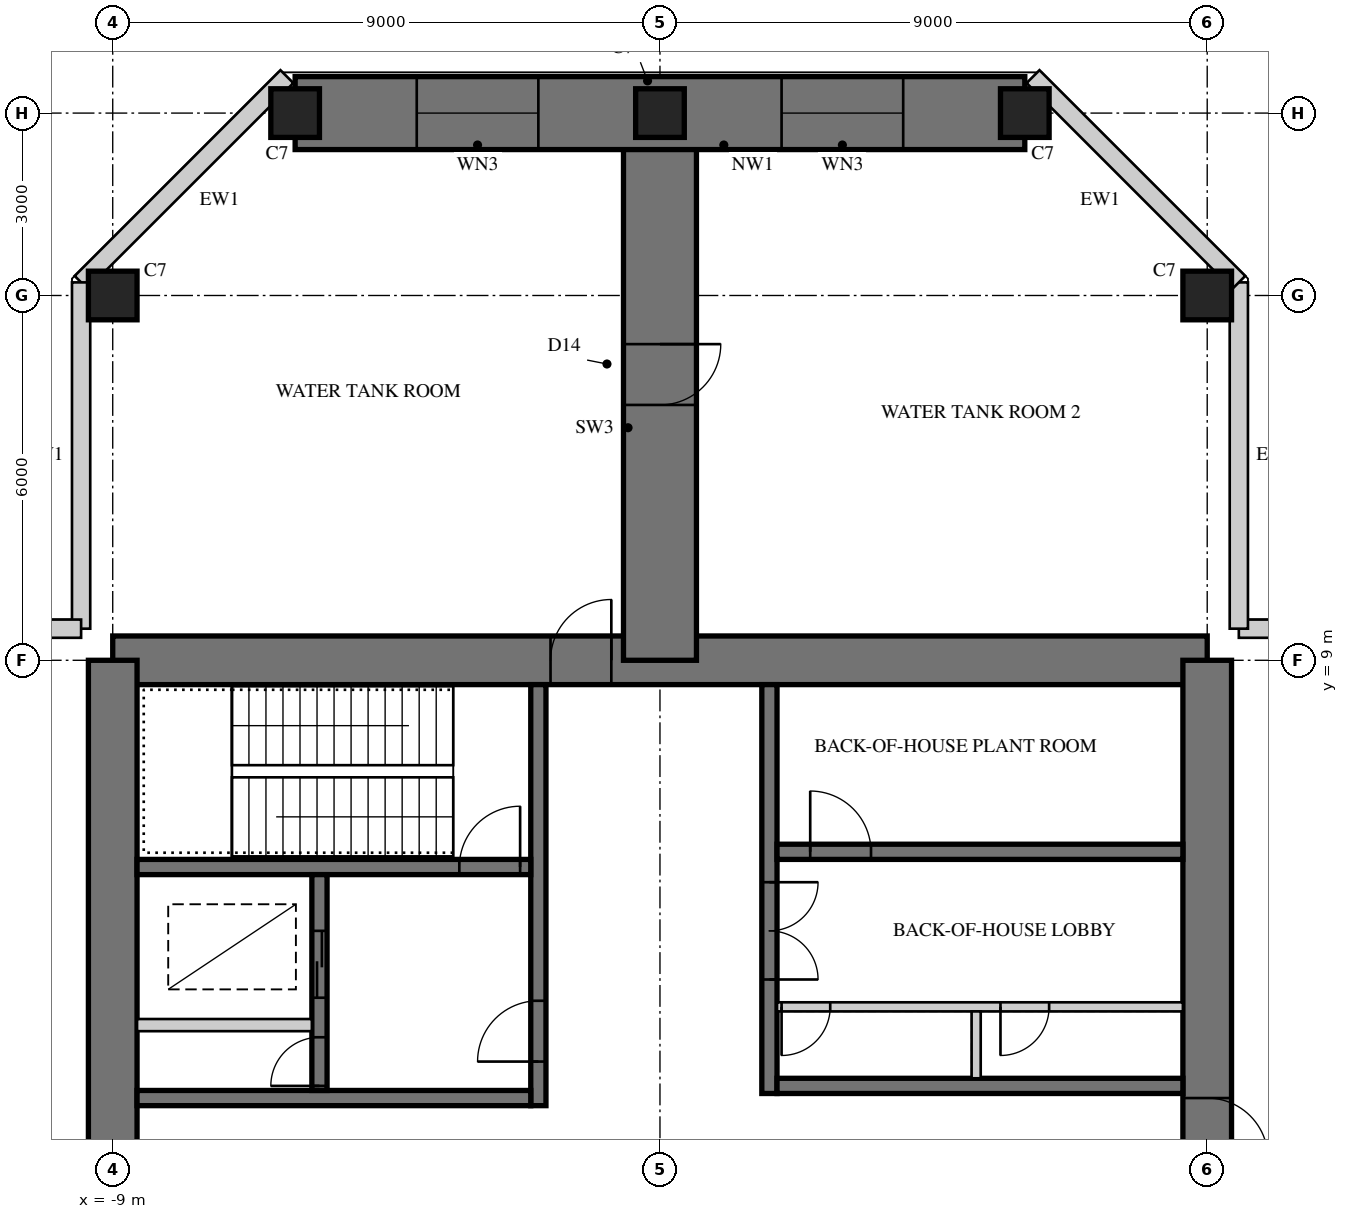
"""IFC4 building model, lengths in metres.
Left out: names, types, materials, properties, quantities, classifications, styles, units other than length and angle.
Written with IfcOpenShell. Run it as: python <this file> out.ifc"""

import sys

from ifc_helpers import new_model, si_unit, direction, frame, frame_2d, origin, origin_2d, place, context, subcontext, project, spatial, rectangle, hollow_rectangle, extrude, element, fill, save


model = new_model("IFC4")
c1 = context("Model", 3, precision=1e-05, world=origin(), true_north=direction((0.0, 1.0)))
c2 = subcontext(c1, "Body", "Model", "MODEL_VIEW")
j1 = project(units=[si_unit("LENGTHUNIT", "METRE"), si_unit("PLANEANGLEUNIT", "RADIAN")], contexts=[c1])
p1 = place(None, origin())
s1 = spatial("IfcSite", under=j1, at=p1, CompositionType="ELEMENT")
p2 = place(p1, origin())
s2 = spatial("IfcBuilding", under=s1, at=p2, CompositionType="ELEMENT")
p3 = place(p2, frame((0.0, 0.0, 252.7)))
s3 = spatial("IfcBuildingStorey", under=s2, at=p3, CompositionType="ELEMENT", Elevation=252.7)
p4 = place(p3, frame((9.0, 9.0, 0.0), z_axis=(0.0, 0.0, 1.0), x_axis=(-1.0, 0.0, 0.0)))
e1 = element("IfcWall", 1, at=p4, inside=s3, PredefinedType="SHEAR", context=c2, shape_type="SweptSolid", body=[
    extrude(rectangle(XDim=18.0, YDim=0.8, at=frame_2d((9.0, 0.0))), origin(), (0.0, 0.0, 1.0), 5.0),
])
p5 = place(p4, frame((9.8, 0.0, 0.0)))
e2 = element("IfcOpeningElement", 2, at=p5, cuts=e1, PredefinedType="OPENING", context=c2, shape_type="SweptSolid", body=[
    extrude(rectangle(XDim=1.0, YDim=2.4, at=frame_2d((0.5, 1.2))), frame((0.0, 0.41, 0.0), z_axis=(0.0, -1.0, 0.0), x_axis=(1.0, 0.0, 0.0)), (0.0, 0.0, 1.0), 0.82),
])
p6 = place(p3, frame((9.0, -9.0, 0.0), z_axis=(0.0, 0.0, 1.0), x_axis=(0.0, 1.0, 0.0)))
e3 = element("IfcWall", 3, at=p6, inside=s3, PredefinedType="SHEAR", context=c2, shape_type="SweptSolid", body=[
    extrude(rectangle(XDim=18.0, YDim=0.8, at=frame_2d((9.0, 0.0))), origin(), (0.0, 0.0, 1.0), 5.0),
])
p7 = place(p6, frame((9.8, 0.0, 0.0)))
e4 = element("IfcOpeningElement", 4, at=p7, cuts=e3, PredefinedType="OPENING", context=c2, shape_type="SweptSolid", body=[
    extrude(rectangle(XDim=1.0, YDim=2.4, at=frame_2d((0.5, 1.2))), frame((0.0, 0.41, 0.0), z_axis=(0.0, -1.0, 0.0), x_axis=(1.0, 0.0, 0.0)), (0.0, 0.0, 1.0), 0.82),
])
p8 = place(p3, frame((-9.0, 9.0, 0.0), z_axis=(0.0, 0.0, 1.0), x_axis=(0.0, -1.0, 0.0)))
e5 = element("IfcWall", 5, at=p8, inside=s3, PredefinedType="SHEAR", context=c2, shape_type="SweptSolid", body=[
    extrude(rectangle(XDim=18.0, YDim=0.8, at=frame_2d((9.0, 0.0))), origin(), (0.0, 0.0, 1.0), 5.0),
])
p9 = place(p8, frame((9.8, 0.0, 0.0)))
e6 = element("IfcOpeningElement", 6, at=p9, cuts=e5, PredefinedType="OPENING", context=c2, shape_type="SweptSolid", body=[
    extrude(rectangle(XDim=1.0, YDim=2.4, at=frame_2d((0.5, 1.2))), frame((0.0, 0.41, 0.0), z_axis=(0.0, -1.0, 0.0), x_axis=(1.0, 0.0, 0.0)), (0.0, 0.0, 1.0), 0.82),
])
p10 = place(p3, frame((1.8, 1.875, 0.0), z_axis=(0.0, 0.0, 1.0), x_axis=(0.0, 1.0, 0.0)))
e7 = element("IfcWall", 7, at=p10, inside=s3, PredefinedType="SHEAR", context=c2, shape_type="SweptSolid", body=[
    extrude(rectangle(XDim=6.725, YDim=0.25, at=frame_2d((3.363, 0.0))), origin(), (0.0, 0.0, 1.0), 5.0),
])
p11 = place(p10, frame((1.875, 0.0, 0.0)))
e8 = element("IfcOpeningElement", 8, at=p11, cuts=e7, PredefinedType="OPENING", context=c2, shape_type="SweptSolid", body=[
    extrude(rectangle(XDim=1.6, YDim=2.4, at=frame_2d((0.8, 1.2))), frame((0.0, 0.135, 0.0), z_axis=(0.0, -1.0, 0.0), x_axis=(1.0, 0.0, 0.0)), (0.0, 0.0, 1.0), 0.27),
])
p12 = place(p3, frame((1.925, 2.0, 0.0), z_axis=(0.0, 0.0, 1.0), x_axis=(1.0, 0.0, 0.0)))
e9 = element("IfcWall", 9, at=p12, inside=s3, PredefinedType="SHEAR", context=c2, shape_type="SweptSolid", body=[
    extrude(rectangle(XDim=6.675, YDim=0.25, at=frame_2d((3.337, 0.0))), origin(), (0.0, 0.0, 1.0), 5.0),
])
p13 = place(p3, frame((1.925, 5.85, 0.0), z_axis=(0.0, 0.0, 1.0), x_axis=(1.0, 0.0, 0.0)))
e10 = element("IfcWall", 10, at=p13, inside=s3, PredefinedType="SHEAR", context=c2, shape_type="SweptSolid", body=[
    extrude(rectangle(XDim=6.675, YDim=0.25, at=frame_2d((3.337, 0.0))), origin(), (0.0, 0.0, 1.0), 5.0),
])
p14 = place(p13, frame((0.546, 0.0, 0.0)))
e11 = element("IfcOpeningElement", 11, at=p14, cuts=e10, PredefinedType="OPENING", context=c2, shape_type="SweptSolid", body=[
    extrude(rectangle(XDim=1.0, YDim=2.1, at=frame_2d((0.5, 1.05))), frame((0.0, 0.135, 0.0), z_axis=(0.0, -1.0, 0.0), x_axis=(1.0, 0.0, 0.0)), (0.0, 0.0, 1.0), 0.27),
])
p15 = place(p3, frame((1.925, 3.3, 0.0), z_axis=(0.0, 0.0, 1.0), x_axis=(1.0, 0.0, 0.0)))
e12 = element("IfcWall", 12, at=p15, inside=s3, PredefinedType="PARTITIONING", context=c2, shape_type="SweptSolid", body=[
    extrude(rectangle(XDim=6.675, YDim=0.15, at=frame_2d((3.337, 0.0))), origin(), (0.0, 0.0, 1.0), 5.0),
])
p16 = place(p15, frame((0.075, 0.0, 0.0)))
e13 = element("IfcOpeningElement", 13, at=p16, cuts=e12, PredefinedType="OPENING", context=c2, shape_type="SweptSolid", body=[
    extrude(rectangle(XDim=0.8, YDim=2.1, at=frame_2d((0.4, 1.05))), frame((0.0, 0.085, 0.0), z_axis=(0.0, -1.0, 0.0), x_axis=(1.0, 0.0, 0.0)), (0.0, 0.0, 1.0), 0.17),
])
p17 = place(p15, frame((3.675, 0.0, 0.0)))
e14 = element("IfcOpeningElement", 14, at=p17, cuts=e12, PredefinedType="OPENING", context=c2, shape_type="SweptSolid", body=[
    extrude(rectangle(XDim=0.8, YDim=2.1, at=frame_2d((0.4, 1.05))), frame((0.0, 0.085, 0.0), z_axis=(0.0, -1.0, 0.0), x_axis=(1.0, 0.0, 0.0)), (0.0, 0.0, 1.0), 0.17),
])
p18 = place(p3, frame((5.2, 2.125, 0.0), z_axis=(0.0, 0.0, 1.0), x_axis=(0.0, 1.0, 0.0)))
e15 = element("IfcWall", 15, at=p18, inside=s3, PredefinedType="PARTITIONING", context=c2, shape_type="SweptSolid", body=[
    extrude(rectangle(XDim=1.1, YDim=0.15, at=frame_2d((0.55, 0.0))), origin(), (0.0, 0.0, 1.0), 5.0),
])
p19 = place(p3, frame((-2.0, 1.675, 0.0), z_axis=(0.0, 0.0, 1.0), x_axis=(0.0, 1.0, 0.0)))
e16 = element("IfcWall", 16, at=p19, inside=s3, PredefinedType="SHEAR", context=c2, shape_type="SweptSolid", body=[
    extrude(rectangle(XDim=6.925, YDim=0.25, at=frame_2d((3.462, 0.0))), origin(), (0.0, 0.0, 1.0), 5.0),
])
p20 = place(p19, frame((0.725, 0.0, 0.0)))
e17 = element("IfcOpeningElement", 17, at=p20, cuts=e16, PredefinedType="OPENING", context=c2, shape_type="SweptSolid", body=[
    extrude(rectangle(XDim=1.0, YDim=2.1, at=frame_2d((0.5, 1.05))), frame((0.0, 0.135, 0.0), z_axis=(0.0, -1.0, 0.0), x_axis=(1.0, 0.0, 0.0)), (0.0, 0.0, 1.0), 0.27),
])
p21 = place(p3, frame((-2.125, 1.8, 0.0), z_axis=(0.0, 0.0, 1.0), x_axis=(-1.0, 0.0, 0.0)))
e18 = element("IfcWall", 18, at=p21, inside=s3, PredefinedType="SHEAR", context=c2, shape_type="SweptSolid", body=[
    extrude(rectangle(XDim=6.475, YDim=0.25, at=frame_2d((3.238, 0.0))), origin(), (0.0, 0.0, 1.0), 5.0),
])
p22 = place(p3, frame((-2.125, 5.6, 0.0), z_axis=(0.0, 0.0, 1.0), x_axis=(-1.0, 0.0, 0.0)))
e19 = element("IfcWall", 19, at=p22, inside=s3, PredefinedType="SHEAR", context=c2, shape_type="SweptSolid", body=[
    extrude(rectangle(XDim=6.475, YDim=0.25, at=frame_2d((3.238, 0.0))), origin(), (0.0, 0.0, 1.0), 5.0),
])
p23 = place(p22, frame((0.175, 0.0, 0.0)))
e20 = element("IfcOpeningElement", 20, at=p23, cuts=e19, PredefinedType="OPENING", context=c2, shape_type="SweptSolid", body=[
    extrude(rectangle(XDim=1.0, YDim=2.1, at=frame_2d((0.5, 1.05))), frame((0.0, 0.135, 0.0), z_axis=(0.0, -1.0, 0.0), x_axis=(1.0, 0.0, 0.0)), (0.0, 0.0, 1.0), 0.27),
])
p24 = place(p3, frame((-5.6, 1.925, 0.0), z_axis=(0.0, 0.0, 1.0), x_axis=(0.0, 1.0, 0.0)))
e21 = element("IfcWall", 21, at=p24, inside=s3, PredefinedType="SHEAR", context=c2, shape_type="SweptSolid", body=[
    extrude(rectangle(XDim=3.55, YDim=0.25, at=frame_2d((1.775, 0.0))), origin(), (0.0, 0.0, 1.0), 5.0),
])
p25 = place(p24, frame((1.525, 0.0, 0.0)))
e22 = element("IfcOpeningElement", 22, at=p25, cuts=e21, PredefinedType="OPENING", context=c2, shape_type="SweptSolid", body=[
    extrude(rectangle(XDim=1.1, YDim=2.2, at=frame_2d((0.55, 1.1))), frame((0.0, 0.135, 0.0), z_axis=(0.0, -1.0, 0.0), x_axis=(1.0, 0.0, 0.0)), (0.0, 0.0, 1.0), 0.27),
])
p26 = place(p24, frame((0.075, 0.0, 0.0)))
e23 = element("IfcOpeningElement", 23, at=p26, cuts=e21, PredefinedType="OPENING", context=c2, shape_type="SweptSolid", body=[
    extrude(rectangle(XDim=0.8, YDim=2.1, at=frame_2d((0.4, 1.05))), frame((0.0, 0.135, 0.0), z_axis=(0.0, -1.0, 0.0), x_axis=(1.0, 0.0, 0.0)), (0.0, 0.0, 1.0), 0.27),
])
p27 = place(p3, frame((-5.725, 3.0, 0.0), z_axis=(0.0, 0.0, 1.0), x_axis=(-1.0, 0.0, 0.0)))
e24 = element("IfcWall", 24, at=p27, inside=s3, PredefinedType="PARTITIONING", context=c2, shape_type="SweptSolid", body=[
    extrude(rectangle(XDim=2.875, YDim=0.2, at=frame_2d((1.438, 0.0))), origin(), (0.0, 0.0, 1.0), 5.0),
])
p28 = place(p3, frame((0.0, 9.0, 0.0), z_axis=(0.0, 0.0, 1.0), x_axis=(0.0, 1.0, 0.0)))
e25 = element("IfcWall", 25, at=p28, inside=s3, PredefinedType="SHEAR", context=c2, shape_type="SweptSolid", body=[
    extrude(rectangle(XDim=9.0, YDim=1.2, at=frame_2d((4.5, 0.0))), origin(), (0.0, 0.0, 1.0), 5.0),
])
p29 = place(p28, frame((4.2, 0.0, 0.0)))
e26 = element("IfcOpeningElement", 26, at=p29, cuts=e25, PredefinedType="OPENING", context=c2, shape_type="SweptSolid", body=[
    extrude(rectangle(XDim=1.0, YDim=2.2, at=frame_2d((0.5, 1.1))), frame((0.0, 0.61, 0.0), z_axis=(0.0, -1.0, 0.0), x_axis=(1.0, 0.0, 0.0)), (0.0, 0.0, 1.0), 1.22),
])
p30 = place(p3, frame((6.0, 18.0, 0.0), z_axis=(0.0, 0.0, 1.0), x_axis=(-1.0, 0.0, 0.0)))
e27 = element("IfcWall", 27, at=p30, inside=s3, PredefinedType="SHEAR", context=c2, shape_type="SweptSolid", body=[
    extrude(rectangle(XDim=12.0, YDim=1.2, at=frame_2d((6.0, 0.0))), origin(), (0.0, 0.0, 1.0), 5.0),
])
p31 = place(p30, frame((2.0, 0.0, 0.8)))
e28 = element("IfcOpeningElement", 28, at=p31, cuts=e27, PredefinedType="OPENING", context=c2, shape_type="SweptSolid", body=[
    extrude(rectangle(XDim=2.0, YDim=2.5, at=frame_2d((1.0, 1.25))), frame((0.0, 0.61, 0.0), z_axis=(0.0, -1.0, 0.0), x_axis=(1.0, 0.0, 0.0)), (0.0, 0.0, 1.0), 1.22),
])
p32 = place(p30, frame((8.0, 0.0, 0.8)))
e29 = element("IfcOpeningElement", 29, at=p32, cuts=e27, PredefinedType="OPENING", context=c2, shape_type="SweptSolid", body=[
    extrude(rectangle(XDim=2.0, YDim=2.5, at=frame_2d((1.0, 1.25))), frame((0.0, 0.61, 0.0), z_axis=(0.0, -1.0, 0.0), x_axis=(1.0, 0.0, 0.0)), (0.0, 0.0, 1.0), 1.22),
])
for number, where, z_axis, x_axis in (
    (30, (9.0, 15.0, 0.0), (0.0, 0.0, 1.0), (1.0, 0.0, 0.0)),
    (31, (-9.0, 15.0, 0.0), (0.0, 0.0, 1.0), (1.0, 0.0, 0.0)),
    (32, (6.0, 18.0, 0.0), (0.0, 0.0, 1.0), (1.0, 0.0, 0.0)),
    (33, (0.0, 18.0, 0.0), (0.0, 0.0, 1.0), (1.0, 0.0, 0.0)),
    (34, (-6.0, 18.0, 0.0), (0.0, 0.0, 1.0), (1.0, 0.0, 0.0)),
):
    element("IfcColumn", number, at=place(p3, frame(where, z_axis=z_axis, x_axis=x_axis)), inside=s3, PredefinedType="COLUMN", context=c2, shape_type="SweptSolid", body=[
        extrude(rectangle(XDim=0.8, YDim=0.8, at=origin_2d()), origin(), (0.0, 0.0, 1.0), 5.0),
    ])
for number, where, z_axis, x_axis in (
    (35, (15.215, 9.52, 0.0), (0.0, 0.0, 1.0), (-1.0, 0.0, 0.0)),
    (36, (9.52, 9.52, 0.0), (0.0, 0.0, 1.0), (0.0, 1.0, 0.0)),
):
    element("IfcWall", number, at=place(p3, frame(where, z_axis=z_axis, x_axis=x_axis)), inside=s3, PredefinedType="SOLIDWALL", context=c2, shape_type="SweptSolid", body=[
        extrude(rectangle(XDim=5.695, YDim=0.3, at=frame_2d((2.848, 0.0))), origin(), (0.0, 0.0, 1.0), 4.82),
    ])
for number, where, z_axis, x_axis in (
    (37, (9.52, 15.215, 0.0), (0.0, 0.0, 1.0), (-0.707, 0.707, 0.0)),
    (38, (-6.135, 18.6, 0.0), (0.0, 0.0, 1.0), (-0.707, -0.707, 0.0)),
):
    element("IfcWall", number, at=place(p3, frame(where, z_axis=z_axis, x_axis=x_axis)), inside=s3, PredefinedType="SOLIDWALL", context=c2, shape_type="SweptSolid", body=[
        extrude(rectangle(XDim=4.787, YDim=0.3, at=frame_2d((2.393, 0.0))), origin(), (0.0, 0.0, 1.0), 4.82),
    ])
p33 = place(p3, frame((-9.52, 15.215, 0.0), z_axis=(0.0, 0.0, 1.0), x_axis=(0.0, -1.0, 0.0)))
e39 = element("IfcWall", 39, at=p33, inside=s3, PredefinedType="SOLIDWALL", context=c2, shape_type="SweptSolid", body=[
    extrude(rectangle(XDim=5.695, YDim=0.3, at=frame_2d((2.848, 0.0))), origin(), (0.0, 0.0, 1.0), 4.82),
])
p34 = place(p3, frame((-9.52, 9.52, 0.0), z_axis=(0.0, 0.0, 1.0), x_axis=(-1.0, 0.0, 0.0)))
e40 = element("IfcWall", 40, at=p34, inside=s3, PredefinedType="SOLIDWALL", context=c2, shape_type="SweptSolid", body=[
    extrude(rectangle(XDim=14.695, YDim=0.3, at=frame_2d((7.348, 0.0))), origin(), (0.0, 0.0, 1.0), 4.82),
])
p35 = place(p31, origin())
e41 = element("IfcWindow", 41, at=p35, inside=s3, PartitioningType="SINGLE_PANEL", PredefinedType="WINDOW", context=c2, shape_type="SweptSolid", body=[
    extrude(hollow_rectangle(XDim=2.0, YDim=2.5, WallThickness=0.06, at=frame_2d((1.0, 1.25))), frame((0.0, 0.03, 0.0), z_axis=(0.0, -1.0, 0.0), x_axis=(1.0, 0.0, 0.0)), (0.0, 0.0, 1.0), 0.06),
    extrude(rectangle(XDim=1.879, YDim=2.379, at=frame_2d((1.0, 1.25))), frame((0.0, 0.03, 0.0), z_axis=(0.0, -1.0, 0.0), x_axis=(1.0, 0.0, 0.0)), (0.0, 0.0, 1.0), 0.06),
])
fill(e28, e41)
p36 = place(p32, origin())
e42 = element("IfcWindow", 42, at=p36, inside=s3, PartitioningType="SINGLE_PANEL", PredefinedType="WINDOW", context=c2, shape_type="SweptSolid", body=[
    extrude(hollow_rectangle(XDim=2.0, YDim=2.5, WallThickness=0.06, at=frame_2d((1.0, 1.25))), frame((0.0, 0.03, 0.0), z_axis=(0.0, -1.0, 0.0), x_axis=(1.0, 0.0, 0.0)), (0.0, 0.0, 1.0), 0.06),
    extrude(rectangle(XDim=1.879, YDim=2.379, at=frame_2d((1.0, 1.25))), frame((0.0, 0.03, 0.0), z_axis=(0.0, -1.0, 0.0), x_axis=(1.0, 0.0, 0.0)), (0.0, 0.0, 1.0), 0.06),
])
fill(e29, e42)
p37 = place(p29, frame((1.0, 0.0, 0.0), z_axis=(0.0, 0.0, 1.0), x_axis=(-1.0, 0.0, 0.0)))
e43 = element("IfcDoor", 43, at=p37, inside=s3, OperationType="SINGLE_SWING_LEFT", PredefinedType="DOOR", context=c2, shape_type="SweptSolid", body=[
    extrude(rectangle(XDim=1.0, YDim=2.2, at=frame_2d((0.5, 1.1))), frame((0.0, 0.025, 0.0), z_axis=(0.0, -1.0, 0.0), x_axis=(1.0, 0.0, 0.0)), (0.0, 0.0, 1.0), 0.05),
])
fill(e26, e43)
p38 = place(p5, frame((1.0, 0.0, 0.0), z_axis=(0.0, 0.0, 1.0), x_axis=(-1.0, 0.0, 0.0)))
e44 = element("IfcDoor", 44, at=p38, inside=s3, OperationType="SINGLE_SWING_RIGHT", PredefinedType="DOOR", context=c2, shape_type="SweptSolid", body=[
    extrude(rectangle(XDim=1.0, YDim=2.4, at=frame_2d((0.5, 1.2))), frame((0.0, -0.005, 0.0), z_axis=(0.0, -1.0, 0.0), x_axis=(1.0, 0.0, 0.0)), (0.0, 0.0, 1.0), 0.05),
])
fill(e2, e44)
p39 = place(p7, frame((1.0, 0.0, 0.0), z_axis=(0.0, 0.0, 1.0), x_axis=(-1.0, 0.0, 0.0)))
e45 = element("IfcDoor", 45, at=p39, inside=s3, OperationType="SINGLE_SWING_RIGHT", PredefinedType="DOOR", context=c2, shape_type="SweptSolid", body=[
    extrude(rectangle(XDim=1.0, YDim=2.4, at=frame_2d((0.5, 1.2))), frame((0.0, -0.005, 0.0), z_axis=(0.0, -1.0, 0.0), x_axis=(1.0, 0.0, 0.0)), (0.0, 0.0, 1.0), 0.05),
])
fill(e4, e45)
p40 = place(p11, frame((1.6, 0.0, 0.0), z_axis=(0.0, 0.0, 1.0), x_axis=(-1.0, 0.0, 0.0)))
e46 = element("IfcDoor", 46, at=p40, inside=s3, OperationType="DOUBLE_DOOR_SINGLE_SWING", PredefinedType="DOOR", context=c2, shape_type="SweptSolid", body=[
    extrude(rectangle(XDim=1.6, YDim=2.4, at=frame_2d((0.8, 1.2))), frame((0.0, 0.025, 0.0), z_axis=(0.0, -1.0, 0.0), x_axis=(1.0, 0.0, 0.0)), (0.0, 0.0, 1.0), 0.05),
])
fill(e8, e46)
p41 = place(p16, frame((0.8, 0.0, 0.0), z_axis=(0.0, 0.0, 1.0), x_axis=(-1.0, 0.0, 0.0)))
e47 = element("IfcDoor", 47, at=p41, inside=s3, OperationType="SINGLE_SWING_RIGHT", PredefinedType="DOOR", context=c2, shape_type="SweptSolid", body=[
    extrude(rectangle(XDim=0.8, YDim=2.1, at=frame_2d((0.4, 1.05))), frame((0.0, 0.025, 0.0), z_axis=(0.0, -1.0, 0.0), x_axis=(1.0, 0.0, 0.0)), (0.0, 0.0, 1.0), 0.05),
])
fill(e13, e47)
p42 = place(p17, frame((0.8, 0.0, 0.0), z_axis=(0.0, 0.0, 1.0), x_axis=(-1.0, 0.0, 0.0)))
e48 = element("IfcDoor", 48, at=p42, inside=s3, OperationType="SINGLE_SWING_RIGHT", PredefinedType="DOOR", context=c2, shape_type="SweptSolid", body=[
    extrude(rectangle(XDim=0.8, YDim=2.1, at=frame_2d((0.4, 1.05))), frame((0.0, 0.025, 0.0), z_axis=(0.0, -1.0, 0.0), x_axis=(1.0, 0.0, 0.0)), (0.0, 0.0, 1.0), 0.05),
])
fill(e14, e48)
p43 = place(p20, origin())
e49 = element("IfcDoor", 49, at=p43, inside=s3, OperationType="SINGLE_SWING_LEFT", PredefinedType="DOOR", context=c2, shape_type="SweptSolid", body=[
    extrude(rectangle(XDim=1.0, YDim=2.1, at=frame_2d((0.5, 1.05))), frame((0.0, 0.025, 0.0), z_axis=(0.0, -1.0, 0.0), x_axis=(1.0, 0.0, 0.0)), (0.0, 0.0, 1.0), 0.05),
])
fill(e17, e49)
p44 = place(p23, frame((1.0, 0.0, 0.0), z_axis=(0.0, 0.0, 1.0), x_axis=(-1.0, 0.0, 0.0)))
e50 = element("IfcDoor", 50, at=p44, inside=s3, OperationType="SINGLE_SWING_RIGHT", PredefinedType="DOOR", context=c2, shape_type="SweptSolid", body=[
    extrude(rectangle(XDim=1.0, YDim=2.1, at=frame_2d((0.5, 1.05))), frame((0.0, 0.025, 0.0), z_axis=(0.0, -1.0, 0.0), x_axis=(1.0, 0.0, 0.0)), (0.0, 0.0, 1.0), 0.05),
])
fill(e20, e50)
p45 = place(p25, origin())
e51 = element("IfcDoor", 51, at=p45, inside=s3, OperationType="DOUBLE_DOOR_SLIDING", PredefinedType="DOOR", context=c2, shape_type="SweptSolid", body=[
    extrude(rectangle(XDim=1.1, YDim=2.2, at=frame_2d((0.55, 1.1))), frame((0.0, 0.025, 0.0), z_axis=(0.0, -1.0, 0.0), x_axis=(1.0, 0.0, 0.0)), (0.0, 0.0, 1.0), 0.05),
])
fill(e22, e51)
p46 = place(p26, origin())
e52 = element("IfcDoor", 52, at=p46, inside=s3, OperationType="SINGLE_SWING_LEFT", PredefinedType="DOOR", context=c2, shape_type="SweptSolid", body=[
    extrude(rectangle(XDim=0.8, YDim=2.1, at=frame_2d((0.4, 1.05))), frame((0.0, 0.025, 0.0), z_axis=(0.0, -1.0, 0.0), x_axis=(1.0, 0.0, 0.0)), (0.0, 0.0, 1.0), 0.05),
])
fill(e23, e52)
p47 = place(p14, origin())
e53 = element("IfcDoor", 53, at=p47, inside=s3, OperationType="SINGLE_SWING_LEFT", PredefinedType="DOOR", context=c2, shape_type="SweptSolid", body=[
    extrude(rectangle(XDim=1.0, YDim=2.1, at=frame_2d((0.5, 1.05))), frame((0.0, 0.025, 0.0), z_axis=(0.0, -1.0, 0.0), x_axis=(1.0, 0.0, 0.0)), (0.0, 0.0, 1.0), 0.05),
])
fill(e11, e53)
save(model, sys.argv[1])
